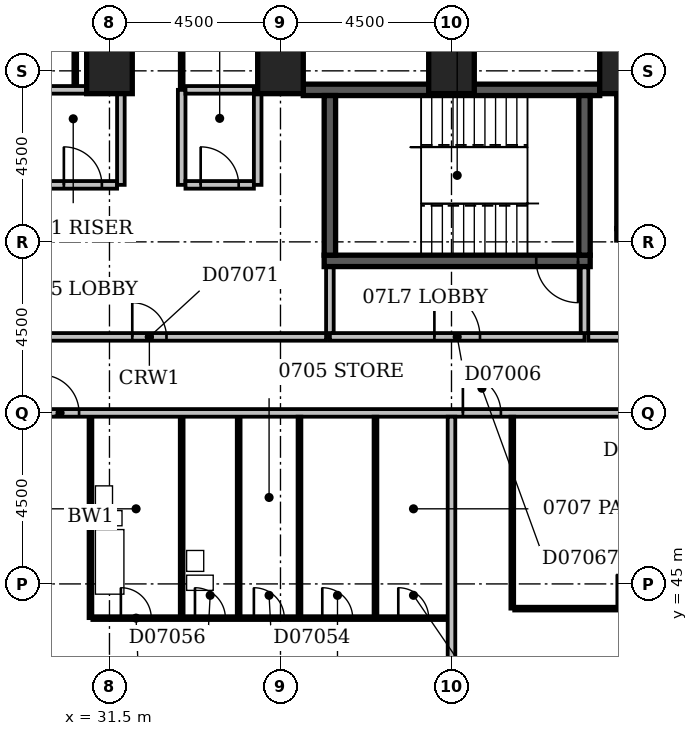
"""IFC4 building model, lengths in metres.
Left out: names, types, materials, properties, quantities, classifications, styles, units other than length and angle.
Written with IfcOpenShell. Run it as: python <this file> out.ifc"""

import sys

from ifc_helpers import new_model, si_unit, direction, frame, frame_2d, origin, origin_2d, place, context, subcontext, project, spatial, rectangle, extrude, element, fill, save


model = new_model("IFC4")
c1 = context("Model", 3, precision=1e-05, world=origin(), true_north=direction((0.0, 1.0)))
c2 = subcontext(c1, "Body", "Model", "MODEL_VIEW")
j1 = project(units=[si_unit("LENGTHUNIT", "METRE"), si_unit("PLANEANGLEUNIT", "RADIAN")], contexts=[c1])
p1 = place(None, origin())
s1 = spatial("IfcSite", under=j1, at=p1, CompositionType="ELEMENT")
p2 = place(p1, origin())
s2 = spatial("IfcBuilding", under=s1, at=p2, CompositionType="ELEMENT")
p3 = place(p2, frame((0.0, 0.0, 36.2)))
s3 = spatial("IfcBuildingStorey", under=s2, at=p3, CompositionType="ELEMENT", Elevation=36.2)
p4 = place(p3, frame((36.6, 58.0, -0.3), z_axis=(0.0, 0.0, 1.0), x_axis=(1.0, 0.0, 0.0)))
e1 = element("IfcWall", 1, at=p4, inside=s3, PredefinedType="SHEAR", context=c2, shape_type="SweptSolid", body=[
    extrude(rectangle(XDim=7.8, YDim=0.3, at=frame_2d((3.9, 0.0))), origin(), (0.0, 0.0, 1.0), 3.6),
])
p5 = place(p3, frame((37.15, 53.5, -0.3), z_axis=(0.0, 0.0, 1.0), x_axis=(1.0, 0.0, 0.0)))
e2 = element("IfcWall", 2, at=p5, inside=s3, PredefinedType="SHEAR", context=c2, shape_type="SweptSolid", body=[
    extrude(rectangle(XDim=7.0, YDim=0.3, at=frame_2d((3.5, 0.0))), origin(), (0.0, 0.0, 1.0), 3.6),
])
p6 = place(p5, frame((5.58, 0.0, 0.3)))
e3 = element("IfcOpeningElement", 3, at=p6, cuts=e2, PredefinedType="OPENING", context=c2, shape_type="SweptSolid", body=[
    extrude(rectangle(XDim=1.1, YDim=2.1, at=frame_2d((0.55, 1.05))), frame((0.0, 0.162, 0.0), z_axis=(0.0, -1.0, 0.0), x_axis=(1.0, 0.0, 0.0)), (0.0, 0.0, 1.0), 0.324),
])
for number, where, z_axis, x_axis in (
    (4, (37.3, 53.65, -0.3), (0.0, 0.0, 1.0), (0.0, 1.0, 0.0)),
    (5, (44.0, 53.65, -0.3), (0.0, 0.0, 1.0), (0.0, 1.0, 0.0)),
):
    element("IfcWall", number, at=place(p3, frame(where, z_axis=z_axis, x_axis=x_axis)), inside=s3, PredefinedType="SHEAR", context=c2, shape_type="SweptSolid", body=[
        extrude(rectangle(XDim=4.2, YDim=0.3, at=frame_2d((2.1, 0.0))), origin(), (0.0, 0.0, 1.0), 3.6),
    ])
p7 = place(p3, frame((44.85, 54.2, -0.3), z_axis=(0.0, 0.0, 1.0), x_axis=(1.0, 0.0, 0.0)))
e6 = element("IfcWall", 6, at=p7, inside=s3, PredefinedType="SHEAR", context=c2, shape_type="SweptSolid", body=[
    extrude(rectangle(XDim=2.15, YDim=0.3, at=frame_2d((1.075, 0.0))), origin(), (0.0, 0.0, 1.0), 3.6),
])
p8 = place(p7, frame((0.65, 0.0, 0.3)))
e7 = element("IfcOpeningElement", 7, at=p8, cuts=e6, PredefinedType="OPENING", context=c2, shape_type="SweptSolid", body=[
    extrude(rectangle(XDim=1.0, YDim=2.1, at=frame_2d((0.5, 1.05))), frame((0.0, 0.162, 0.0), z_axis=(0.0, -1.0, 0.0), x_axis=(1.0, 0.0, 0.0)), (0.0, 0.0, 1.0), 0.324),
])
p9 = place(p3, frame((44.85, 58.0, -0.3), z_axis=(0.0, 0.0, 1.0), x_axis=(1.0, 0.0, 0.0)))
e8 = element("IfcWall", 8, at=p9, inside=s3, PredefinedType="SHEAR", context=c2, shape_type="SweptSolid", body=[
    extrude(rectangle(XDim=2.15, YDim=0.3, at=frame_2d((1.075, 0.0))), origin(), (0.0, 0.0, 1.0), 3.6),
])
p10 = place(p3, frame((45.0, 54.35, -0.3), z_axis=(0.0, 0.0, 1.0), x_axis=(0.0, 1.0, 0.0)))
e9 = element("IfcWall", 9, at=p10, inside=s3, PredefinedType="SHEAR", context=c2, shape_type="SweptSolid", body=[
    extrude(rectangle(XDim=3.5, YDim=0.3, at=frame_2d((1.75, 0.0))), origin(), (0.0, 0.0, 1.0), 3.6),
])
for number, where, z_axis, x_axis in (
    (10, (31.5, 58.5, -0.3), (0.0, 0.0, 1.0), (1.0, 0.0, 0.0)),
    (11, (36.0, 58.5, -0.3), (0.0, 0.0, 1.0), (1.0, 0.0, 0.0)),
    (12, (40.5, 58.5, -0.3), (0.0, 0.0, 1.0), (1.0, 0.0, 0.0)),
    (13, (45.0, 58.5, -0.3), (0.0, 0.0, 1.0), (1.0, 0.0, 0.0)),
):
    element("IfcColumn", number, at=place(p3, frame(where, z_axis=z_axis, x_axis=x_axis)), inside=s3, PredefinedType="COLUMN", context=c2, shape_type="SweptSolid", body=[
        extrude(rectangle(XDim=1.2, YDim=1.2, at=origin_2d()), origin(), (0.0, 0.0, 1.0), 3.6),
    ])
p11 = place(p3, frame((37.3, 51.5, 0.0), z_axis=(0.0, 0.0, 1.0), x_axis=(1.0, 0.0, 0.0)))
e14 = element("IfcWall", 14, at=p11, inside=s3, PredefinedType="PARTITIONING", context=c2, shape_type="SweptSolid", body=[
    extrude(rectangle(XDim=6.7, YDim=0.2, at=frame_2d((3.35, 0.0))), origin(), (0.0, 0.0, 1.0), 3.3),
])
p12 = place(p11, frame((2.75, 0.0, 0.0)))
e15 = element("IfcOpeningElement", 15, at=p12, cuts=e14, PredefinedType="OPENING", context=c2, shape_type="SweptSolid", body=[
    extrude(rectangle(XDim=1.2, YDim=2.1, at=frame_2d((0.6, 1.05))), frame((0.0, 0.112, 0.0), z_axis=(0.0, -1.0, 0.0), x_axis=(1.0, 0.0, 0.0)), (0.0, 0.0, 1.0), 0.224),
])
for number, where, z_axis, x_axis in (
    (16, (44.0, 51.6, 0.0), (0.0, 0.0, 1.0), (0.0, 1.0, 0.0)),
    (17, (37.3, 51.6, 0.0), (0.0, 0.0, 1.0), (0.0, 1.0, 0.0)),
):
    element("IfcWall", number, at=place(p3, frame(where, z_axis=z_axis, x_axis=x_axis)), inside=s3, PredefinedType="PARTITIONING", context=c2, shape_type="SweptSolid", body=[
        extrude(rectangle(XDim=1.73, YDim=0.2, at=frame_2d((0.865, 0.0))), origin(), (0.0, 0.0, 1.0), 3.3),
    ])
p13 = place(p3, frame((40.5, 36.6, 0.0), z_axis=(0.0, 0.0, 1.0), x_axis=(0.0, 1.0, 0.0)))
e18 = element("IfcWall", 18, at=p13, inside=s3, PredefinedType="PARTITIONING", context=c2, shape_type="SweptSolid", body=[
    extrude(rectangle(XDim=12.8, YDim=0.2, at=frame_2d((6.4, 0.0))), origin(), (0.0, 0.0, 1.0), 3.3),
])
p14 = place(p3, frame((31.0, 44.1, 0.0), z_axis=(0.0, 0.0, 1.0), x_axis=(0.0, 1.0, 0.0)))
e19 = element("IfcWall", 19, at=p14, inside=s3, PredefinedType="PLUMBINGWALL", context=c2, shape_type="SweptSolid", body=[
    extrude(rectangle(XDim=5.3, YDim=0.1, at=frame_2d((2.65, 0.0))), origin(), (0.0, 0.0, 1.0), 3.3),
])
p15 = place(p3, frame((31.05, 44.1, 0.0), z_axis=(0.0, 0.0, 1.0), x_axis=(1.0, 0.0, 0.0)))
e20 = element("IfcWall", 20, at=p15, inside=s3, PredefinedType="PARTITIONING", context=c2, shape_type="SweptSolid", body=[
    extrude(rectangle(XDim=9.35, YDim=0.1, at=frame_2d((4.675, 0.0))), origin(), (0.0, 0.0, 1.0), 3.3),
])
p16 = place(p15, frame((0.75, 0.0, 0.0)))
e21 = element("IfcOpeningElement", 21, at=p16, cuts=e20, PredefinedType="OPENING", context=c2, shape_type="SweptSolid", body=[
    extrude(rectangle(XDim=0.8, YDim=2.1, at=frame_2d((0.4, 1.05))), frame((0.0, 0.062, 0.0), z_axis=(0.0, -1.0, 0.0), x_axis=(1.0, 0.0, 0.0)), (0.0, 0.0, 1.0), 0.124),
])
p17 = place(p15, frame((8.05, 0.0, 0.0)))
e22 = element("IfcOpeningElement", 22, at=p17, cuts=e20, PredefinedType="OPENING", context=c2, shape_type="SweptSolid", body=[
    extrude(rectangle(XDim=0.8, YDim=2.1, at=frame_2d((0.4, 1.05))), frame((0.0, 0.062, 0.0), z_axis=(0.0, -1.0, 0.0), x_axis=(1.0, 0.0, 0.0)), (0.0, 0.0, 1.0), 0.124),
])
p18 = place(p15, frame((4.25, 0.0, 0.0)))
e23 = element("IfcOpeningElement", 23, at=p18, cuts=e20, PredefinedType="OPENING", context=c2, shape_type="SweptSolid", body=[
    extrude(rectangle(XDim=0.8, YDim=2.1, at=frame_2d((0.4, 1.05))), frame((0.0, 0.062, 0.0), z_axis=(0.0, -1.0, 0.0), x_axis=(1.0, 0.0, 0.0)), (0.0, 0.0, 1.0), 0.124),
])
p19 = place(p15, frame((6.05, 0.0, 0.0)))
e24 = element("IfcOpeningElement", 24, at=p19, cuts=e20, PredefinedType="OPENING", context=c2, shape_type="SweptSolid", body=[
    extrude(rectangle(XDim=0.8, YDim=2.1, at=frame_2d((0.4, 1.05))), frame((0.0, 0.062, 0.0), z_axis=(0.0, -1.0, 0.0), x_axis=(1.0, 0.0, 0.0)), (0.0, 0.0, 1.0), 0.124),
])
p20 = place(p15, frame((2.7, 0.0, 0.0)))
e25 = element("IfcOpeningElement", 25, at=p20, cuts=e20, PredefinedType="OPENING", context=c2, shape_type="SweptSolid", body=[
    extrude(rectangle(XDim=0.8, YDim=2.1, at=frame_2d((0.4, 1.05))), frame((0.0, 0.062, 0.0), z_axis=(0.0, -1.0, 0.0), x_axis=(1.0, 0.0, 0.0)), (0.0, 0.0, 1.0), 0.124),
])
for number, where, z_axis, x_axis in (
    (26, (33.4, 44.15, 0.0), (0.0, 0.0, 1.0), (0.0, 1.0, 0.0)),
    (27, (34.9, 44.15, 0.0), (0.0, 0.0, 1.0), (0.0, 1.0, 0.0)),
):
    element("IfcWall", number, at=place(p3, frame(where, z_axis=z_axis, x_axis=x_axis)), inside=s3, PredefinedType="PLUMBINGWALL", context=c2, shape_type="SweptSolid", body=[
        extrude(rectangle(XDim=5.25, YDim=0.1, at=frame_2d((2.625, 0.0))), origin(), (0.0, 0.0, 1.0), 3.3),
    ])
p21 = place(p3, frame((36.5, 44.15, 0.0), z_axis=(0.0, 0.0, 1.0), x_axis=(0.0, 1.0, 0.0)))
e28 = element("IfcWall", 28, at=p21, inside=s3, PredefinedType="PARTITIONING", context=c2, shape_type="SweptSolid", body=[
    extrude(rectangle(XDim=5.25, YDim=0.1, at=frame_2d((2.625, 0.0))), origin(), (0.0, 0.0, 1.0), 2.4),
])
p22 = place(p3, frame((38.5, 44.15, 0.0), z_axis=(0.0, 0.0, 1.0), x_axis=(0.0, 1.0, 0.0)))
e29 = element("IfcWall", 29, at=p22, inside=s3, PredefinedType="PARTITIONING", context=c2, shape_type="SweptSolid", body=[
    extrude(rectangle(XDim=5.25, YDim=0.1, at=frame_2d((2.625, 0.0))), origin(), (0.0, 0.0, 1.0), 3.3),
])
p23 = place(p3, frame((42.1, 44.35, 0.0), z_axis=(0.0, 0.0, 1.0), x_axis=(0.0, 1.0, 0.0)))
e30 = element("IfcWall", 30, at=p23, inside=s3, PredefinedType="PARTITIONING", context=c2, shape_type="SweptSolid", body=[
    extrude(rectangle(XDim=5.05, YDim=0.1, at=frame_2d((2.525, 0.0))), origin(), (0.0, 0.0, 1.0), 3.3),
])
p24 = place(p3, frame((42.15, 44.35, 0.0), z_axis=(0.0, 0.0, 1.0), x_axis=(1.0, 0.0, 0.0)))
e31 = element("IfcWall", 31, at=p24, inside=s3, PredefinedType="PARTITIONING", context=c2, shape_type="SweptSolid", body=[
    extrude(rectangle(XDim=11.75, YDim=0.1, at=frame_2d((5.875, 0.0))), origin(), (0.0, 0.0, 1.0), 3.3),
])
p25 = place(p24, frame((7.15, 0.0, 0.0)))
e32 = element("IfcOpeningElement", 32, at=p25, cuts=e31, PredefinedType="OPENING", context=c2, shape_type="SweptSolid", body=[
    extrude(rectangle(XDim=0.8, YDim=2.1, at=frame_2d((0.4, 1.05))), frame((0.0, 0.062, 0.0), z_axis=(0.0, -1.0, 0.0), x_axis=(1.0, 0.0, 0.0)), (0.0, 0.0, 1.0), 0.124),
])
p26 = place(p24, frame((2.7, 0.0, 0.0)))
e33 = element("IfcOpeningElement", 33, at=p26, cuts=e31, PredefinedType="OPENING", context=c2, shape_type="SweptSolid", body=[
    extrude(rectangle(XDim=0.9, YDim=2.1, at=frame_2d((0.45, 1.05))), frame((0.0, 0.062, 0.0), z_axis=(0.0, -1.0, 0.0), x_axis=(1.0, 0.0, 0.0)), (0.0, 0.0, 1.0), 0.124),
])
p27 = place(p24, frame((10.65, 0.0, 0.0)))
e34 = element("IfcOpeningElement", 34, at=p27, cuts=e31, PredefinedType="OPENING", context=c2, shape_type="SweptSolid", body=[
    extrude(rectangle(XDim=0.8, YDim=2.1, at=frame_2d((0.4, 1.05))), frame((0.0, 0.062, 0.0), z_axis=(0.0, -1.0, 0.0), x_axis=(1.0, 0.0, 0.0)), (0.0, 0.0, 1.0), 0.124),
])
p28 = place(p24, frame((9.1, 0.0, 0.0)))
e35 = element("IfcOpeningElement", 35, at=p28, cuts=e31, PredefinedType="OPENING", context=c2, shape_type="SweptSolid", body=[
    extrude(rectangle(XDim=0.8, YDim=2.1, at=frame_2d((0.4, 1.05))), frame((0.0, 0.062, 0.0), z_axis=(0.0, -1.0, 0.0), x_axis=(1.0, 0.0, 0.0)), (0.0, 0.0, 1.0), 0.124),
])
p29 = place(p3, frame((9.1, 49.5, 0.0), z_axis=(0.0, 0.0, 1.0), x_axis=(1.0, 0.0, 0.0)))
e36 = element("IfcWall", 36, at=p29, inside=s3, PredefinedType="PARTITIONING", context=c2, shape_type="SweptSolid", body=[
    extrude(rectangle(XDim=57.8, YDim=0.2, at=frame_2d((28.9, 0.0))), origin(), (0.0, 0.0, 1.0), 3.3),
])
p30 = place(p29, frame((20.6, 0.0, 0.0)))
e37 = element("IfcOpeningElement", 37, at=p30, cuts=e36, PredefinedType="OPENING", context=c2, shape_type="SweptSolid", body=[
    extrude(rectangle(XDim=1.0, YDim=2.1, at=frame_2d((0.5, 1.05))), frame((0.0, 0.112, 0.0), z_axis=(0.0, -1.0, 0.0), x_axis=(1.0, 0.0, 0.0)), (0.0, 0.0, 1.0), 0.224),
])
p31 = place(p29, frame((31.7, 0.0, 0.0)))
e38 = element("IfcOpeningElement", 38, at=p31, cuts=e36, PredefinedType="OPENING", context=c2, shape_type="SweptSolid", body=[
    extrude(rectangle(XDim=1.0, YDim=2.1, at=frame_2d((0.5, 1.05))), frame((0.0, 0.112, 0.0), z_axis=(0.0, -1.0, 0.0), x_axis=(1.0, 0.0, 0.0)), (0.0, 0.0, 1.0), 0.224),
])
p32 = place(p29, frame((47.6, 0.0, 0.0)))
e39 = element("IfcOpeningElement", 39, at=p32, cuts=e36, PredefinedType="OPENING", context=c2, shape_type="SweptSolid", body=[
    extrude(rectangle(XDim=1.0, YDim=2.1, at=frame_2d((0.5, 1.05))), frame((0.0, 0.112, 0.0), z_axis=(0.0, -1.0, 0.0), x_axis=(1.0, 0.0, 0.0)), (0.0, 0.0, 1.0), 0.224),
])
p33 = place(p29, frame((54.15, 0.0, 0.0)))
e40 = element("IfcOpeningElement", 40, at=p33, cuts=e36, PredefinedType="OPENING", context=c2, shape_type="SweptSolid", body=[
    extrude(rectangle(XDim=1.0, YDim=2.1, at=frame_2d((0.5, 1.05))), frame((0.0, 0.112, 0.0), z_axis=(0.0, -1.0, 0.0), x_axis=(1.0, 0.0, 0.0)), (0.0, 0.0, 1.0), 0.224),
])
p34 = place(p29, frame((10.65, 0.0, 0.0)))
e41 = element("IfcOpeningElement", 41, at=p34, cuts=e36, PredefinedType="OPENING", context=c2, shape_type="SweptSolid", body=[
    extrude(rectangle(XDim=0.9, YDim=2.1, at=frame_2d((0.45, 1.05))), frame((0.0, 0.112, 0.0), z_axis=(0.0, -1.0, 0.0), x_axis=(1.0, 0.0, 0.0)), (0.0, 0.0, 1.0), 0.224),
])
p35 = place(p3, frame((27.9, 51.5, 0.0), z_axis=(0.0, 0.0, 1.0), x_axis=(1.0, 0.0, 0.0)))
e42 = element("IfcWall", 42, at=p35, inside=s3, PredefinedType="PARTITIONING", context=c2, shape_type="SweptSolid", body=[
    extrude(rectangle(XDim=9.3, YDim=0.2, at=frame_2d((4.65, 0.0))), origin(), (0.0, 0.0, 1.0), 3.3),
])
p36 = place(p35, frame((4.2, 0.0, 0.0)))
e43 = element("IfcOpeningElement", 43, at=p36, cuts=e42, PredefinedType="OPENING", context=c2, shape_type="SweptSolid", body=[
    extrude(rectangle(XDim=0.9, YDim=2.1, at=frame_2d((0.45, 1.05))), frame((0.0, 0.112, 0.0), z_axis=(0.0, -1.0, 0.0), x_axis=(1.0, 0.0, 0.0)), (0.0, 0.0, 1.0), 0.224),
])
p37 = place(p3, frame((44.1, 51.5, 0.0), z_axis=(0.0, 0.0, 1.0), x_axis=(1.0, 0.0, 0.0)))
e44 = element("IfcWall", 44, at=p37, inside=s3, PredefinedType="PARTITIONING", context=c2, shape_type="SweptSolid", body=[
    extrude(rectangle(XDim=2.8, YDim=0.2, at=frame_2d((1.4, 0.0))), origin(), (0.0, 0.0, 1.0), 3.3),
])
p38 = place(p37, frame((0.95, 0.0, 0.0)))
e45 = element("IfcOpeningElement", 45, at=p38, cuts=e44, PredefinedType="OPENING", context=c2, shape_type="SweptSolid", body=[
    extrude(rectangle(XDim=0.9, YDim=2.1, at=frame_2d((0.45, 1.05))), frame((0.0, 0.112, 0.0), z_axis=(0.0, -1.0, 0.0), x_axis=(1.0, 0.0, 0.0)), (0.0, 0.0, 1.0), 0.224),
])
p39 = place(p3, frame((29.9, 55.5, 0.0), z_axis=(0.0, 0.0, 1.0), x_axis=(1.0, 0.0, 0.0)))
e46 = element("IfcWall", 46, at=p39, inside=s3, PredefinedType="PARTITIONING", context=c2, shape_type="SweptSolid", body=[
    extrude(rectangle(XDim=1.8, YDim=0.2, at=frame_2d((0.9, 0.0))), origin(), (0.0, 0.0, 1.0), 3.3),
])
p40 = place(p39, frame((0.4, 0.0, 0.0)))
e47 = element("IfcOpeningElement", 47, at=p40, cuts=e46, PredefinedType="OPENING", context=c2, shape_type="SweptSolid", body=[
    extrude(rectangle(XDim=1.0, YDim=2.1, at=frame_2d((0.5, 1.05))), frame((0.0, 0.112, 0.0), z_axis=(0.0, -1.0, 0.0), x_axis=(1.0, 0.0, 0.0)), (0.0, 0.0, 1.0), 0.224),
])
for number, where, z_axis, x_axis in (
    (48, (31.8, 55.5, 0.0), (0.0, 0.0, 1.0), (0.0, 1.0, 0.0)),
    (49, (33.4, 55.5, 0.0), (0.0, 0.0, 1.0), (0.0, 1.0, 0.0)),
):
    element("IfcWall", number, at=place(p3, frame(where, z_axis=z_axis, x_axis=x_axis)), inside=s3, PredefinedType="PARTITIONING", context=c2, shape_type="SweptSolid", body=[
        extrude(rectangle(XDim=2.5, YDim=0.2, at=frame_2d((1.25, 0.0))), origin(), (0.0, 0.0, 1.0), 3.3),
    ])
p41 = place(p3, frame((33.5, 55.5, 0.0), z_axis=(0.0, 0.0, 1.0), x_axis=(1.0, 0.0, 0.0)))
e50 = element("IfcWall", 50, at=p41, inside=s3, PredefinedType="PARTITIONING", context=c2, shape_type="SweptSolid", body=[
    extrude(rectangle(XDim=1.8, YDim=0.2, at=frame_2d((0.9, 0.0))), origin(), (0.0, 0.0, 1.0), 3.3),
])
p42 = place(p41, frame((0.4, 0.0, 0.0)))
e51 = element("IfcOpeningElement", 51, at=p42, cuts=e50, PredefinedType="OPENING", context=c2, shape_type="SweptSolid", body=[
    extrude(rectangle(XDim=1.0, YDim=2.1, at=frame_2d((0.5, 1.05))), frame((0.0, 0.112, 0.0), z_axis=(0.0, -1.0, 0.0), x_axis=(1.0, 0.0, 0.0)), (0.0, 0.0, 1.0), 0.224),
])
p43 = place(p3, frame((35.4, 55.5, 0.0), z_axis=(0.0, 0.0, 1.0), x_axis=(0.0, 1.0, 0.0)))
e52 = element("IfcWall", 52, at=p43, inside=s3, PredefinedType="PARTITIONING", context=c2, shape_type="SweptSolid", body=[
    extrude(rectangle(XDim=2.5, YDim=0.2, at=frame_2d((1.25, 0.0))), origin(), (0.0, 0.0, 1.0), 2.4),
])
p44 = place(p3, frame((29.9, 58.0, 0.0), z_axis=(0.0, 0.0, 1.0), x_axis=(1.0, 0.0, 0.0)))
e53 = element("IfcWall", 53, at=p44, inside=s3, PredefinedType="PARTITIONING", context=c2, shape_type="SweptSolid", body=[
    extrude(rectangle(XDim=1.8, YDim=0.2, at=frame_2d((0.9, 0.0))), origin(), (0.0, 0.0, 1.0), 3.3),
])
p45 = place(p3, frame((33.4, 58.0, 0.0), z_axis=(0.0, 0.0, 1.0), x_axis=(0.0, 1.0, 0.0)))
e54 = element("IfcWall", 54, at=p45, inside=s3, PredefinedType="PARTITIONING", context=c2, shape_type="SweptSolid", body=[
    extrude(rectangle(XDim=1.1, YDim=0.1, at=frame_2d((0.55, 0.0))), origin(), (0.0, 0.0, 1.0), 3.3),
])
p46 = place(p3, frame((33.5, 58.0, 0.0), z_axis=(0.0, 0.0, 1.0), x_axis=(1.0, 0.0, 0.0)))
e55 = element("IfcWall", 55, at=p46, inside=s3, PredefinedType="PARTITIONING", context=c2, shape_type="SweptSolid", body=[
    extrude(rectangle(XDim=1.8, YDim=0.2, at=frame_2d((0.9, 0.0))), origin(), (0.0, 0.0, 1.0), 3.3),
])
p47 = place(p3, frame((30.6, 58.1, 0.0), z_axis=(0.0, 0.0, 1.0), x_axis=(0.0, 1.0, 0.0)))
e56 = element("IfcWall", 56, at=p47, inside=s3, PredefinedType="PARTITIONING", context=c2, shape_type="SweptSolid", body=[
    extrude(rectangle(XDim=1.0, YDim=0.1, at=frame_2d((0.5, 0.0))), origin(), (0.0, 0.0, 1.0), 3.3),
])
p48 = place(p12, origin())
e57 = element("IfcDoor", 57, at=p48, inside=s3, OperationType="SINGLE_SWING_LEFT", PredefinedType="DOOR", context=c2, shape_type="SweptSolid", body=[
    extrude(rectangle(XDim=1.2, YDim=2.1, at=frame_2d((0.6, 1.05))), frame((0.0, 0.025, 0.0), z_axis=(0.0, -1.0, 0.0), x_axis=(1.0, 0.0, 0.0)), (0.0, 0.0, 1.0), 0.05),
])
fill(e15, e57)
p49 = place(p6, origin())
e58 = element("IfcDoor", 58, at=p49, inside=s3, OperationType="SINGLE_SWING_RIGHT", PredefinedType="DOOR", context=c2, shape_type="SweptSolid", body=[
    extrude(rectangle(XDim=1.1, YDim=2.1, at=frame_2d((0.55, 1.05))), frame((0.0, 0.025, 0.0), z_axis=(0.0, -1.0, 0.0), x_axis=(1.0, 0.0, 0.0)), (0.0, 0.0, 1.0), 0.05),
])
fill(e3, e58)
p50 = place(p16, origin())
e59 = element("IfcDoor", 59, at=p50, inside=s3, OperationType="SINGLE_SWING_LEFT", PredefinedType="DOOR", context=c2, shape_type="SweptSolid", body=[
    extrude(rectangle(XDim=0.8, YDim=2.1, at=frame_2d((0.4, 1.05))), frame((0.0, 0.025, 0.0), z_axis=(0.0, -1.0, 0.0), x_axis=(1.0, 0.0, 0.0)), (0.0, 0.0, 1.0), 0.05),
])
fill(e21, e59)
p51 = place(p17, origin())
e60 = element("IfcDoor", 60, at=p51, inside=s3, OperationType="SINGLE_SWING_LEFT", PredefinedType="DOOR", context=c2, shape_type="SweptSolid", body=[
    extrude(rectangle(XDim=0.8, YDim=2.1, at=frame_2d((0.4, 1.05))), frame((0.0, 0.025, 0.0), z_axis=(0.0, -1.0, 0.0), x_axis=(1.0, 0.0, 0.0)), (0.0, 0.0, 1.0), 0.05),
])
fill(e22, e60)
p52 = place(p18, origin())
e61 = element("IfcDoor", 61, at=p52, inside=s3, OperationType="SINGLE_SWING_LEFT", PredefinedType="DOOR", context=c2, shape_type="SweptSolid", body=[
    extrude(rectangle(XDim=0.8, YDim=2.1, at=frame_2d((0.4, 1.05))), frame((0.0, 0.025, 0.0), z_axis=(0.0, -1.0, 0.0), x_axis=(1.0, 0.0, 0.0)), (0.0, 0.0, 1.0), 0.05),
])
fill(e23, e61)
p53 = place(p19, origin())
e62 = element("IfcDoor", 62, at=p53, inside=s3, OperationType="SINGLE_SWING_LEFT", PredefinedType="DOOR", context=c2, shape_type="SweptSolid", body=[
    extrude(rectangle(XDim=0.8, YDim=2.1, at=frame_2d((0.4, 1.05))), frame((0.0, 0.025, 0.0), z_axis=(0.0, -1.0, 0.0), x_axis=(1.0, 0.0, 0.0)), (0.0, 0.0, 1.0), 0.05),
])
fill(e24, e62)
p54 = place(p20, origin())
e63 = element("IfcDoor", 63, at=p54, inside=s3, OperationType="SINGLE_SWING_LEFT", PredefinedType="DOOR", context=c2, shape_type="SweptSolid", body=[
    extrude(rectangle(XDim=0.8, YDim=2.1, at=frame_2d((0.4, 1.05))), frame((0.0, 0.025, 0.0), z_axis=(0.0, -1.0, 0.0), x_axis=(1.0, 0.0, 0.0)), (0.0, 0.0, 1.0), 0.05),
])
fill(e25, e63)
p55 = place(p26, origin())
e64 = element("IfcDoor", 64, at=p55, inside=s3, OperationType="SINGLE_SWING_LEFT", PredefinedType="DOOR", context=c2, shape_type="SweptSolid", body=[
    extrude(rectangle(XDim=0.9, YDim=2.1, at=frame_2d((0.45, 1.05))), frame((0.0, 0.025, 0.0), z_axis=(0.0, -1.0, 0.0), x_axis=(1.0, 0.0, 0.0)), (0.0, 0.0, 1.0), 0.05),
])
fill(e33, e64)
p56 = place(p30, origin())
e65 = element("IfcDoor", 65, at=p56, inside=s3, OperationType="SINGLE_SWING_LEFT", PredefinedType="DOOR", context=c2, shape_type="SweptSolid", body=[
    extrude(rectangle(XDim=1.0, YDim=2.1, at=frame_2d((0.5, 1.05))), frame((0.0, 0.025, 0.0), z_axis=(0.0, -1.0, 0.0), x_axis=(1.0, 0.0, 0.0)), (0.0, 0.0, 1.0), 0.05),
])
fill(e37, e65)
p57 = place(p31, origin())
e66 = element("IfcDoor", 66, at=p57, inside=s3, OperationType="SINGLE_SWING_LEFT", PredefinedType="DOOR", context=c2, shape_type="SweptSolid", body=[
    extrude(rectangle(XDim=1.0, YDim=2.1, at=frame_2d((0.5, 1.05))), frame((0.0, 0.025, 0.0), z_axis=(0.0, -1.0, 0.0), x_axis=(1.0, 0.0, 0.0)), (0.0, 0.0, 1.0), 0.05),
])
fill(e38, e66)
p58 = place(p36, origin())
e67 = element("IfcDoor", 67, at=p58, inside=s3, OperationType="SINGLE_SWING_LEFT", PredefinedType="DOOR", context=c2, shape_type="SweptSolid", body=[
    extrude(rectangle(XDim=0.9, YDim=2.1, at=frame_2d((0.45, 1.05))), frame((0.0, 0.025, 0.0), z_axis=(0.0, -1.0, 0.0), x_axis=(1.0, 0.0, 0.0)), (0.0, 0.0, 1.0), 0.05),
])
fill(e43, e67)
p59 = place(p40, origin())
e68 = element("IfcDoor", 68, at=p59, inside=s3, OperationType="SINGLE_SWING_LEFT", PredefinedType="DOOR", context=c2, shape_type="SweptSolid", body=[
    extrude(rectangle(XDim=1.0, YDim=2.1, at=frame_2d((0.5, 1.05))), frame((0.0, 0.025, 0.0), z_axis=(0.0, -1.0, 0.0), x_axis=(1.0, 0.0, 0.0)), (0.0, 0.0, 1.0), 0.05),
])
fill(e47, e68)
p60 = place(p42, origin())
e69 = element("IfcDoor", 69, at=p60, inside=s3, OperationType="SINGLE_SWING_LEFT", PredefinedType="DOOR", context=c2, shape_type="SweptSolid", body=[
    extrude(rectangle(XDim=1.0, YDim=2.1, at=frame_2d((0.5, 1.05))), frame((0.0, 0.025, 0.0), z_axis=(0.0, -1.0, 0.0), x_axis=(1.0, 0.0, 0.0)), (0.0, 0.0, 1.0), 0.05),
])
fill(e51, e69)
save(model, sys.argv[1])
